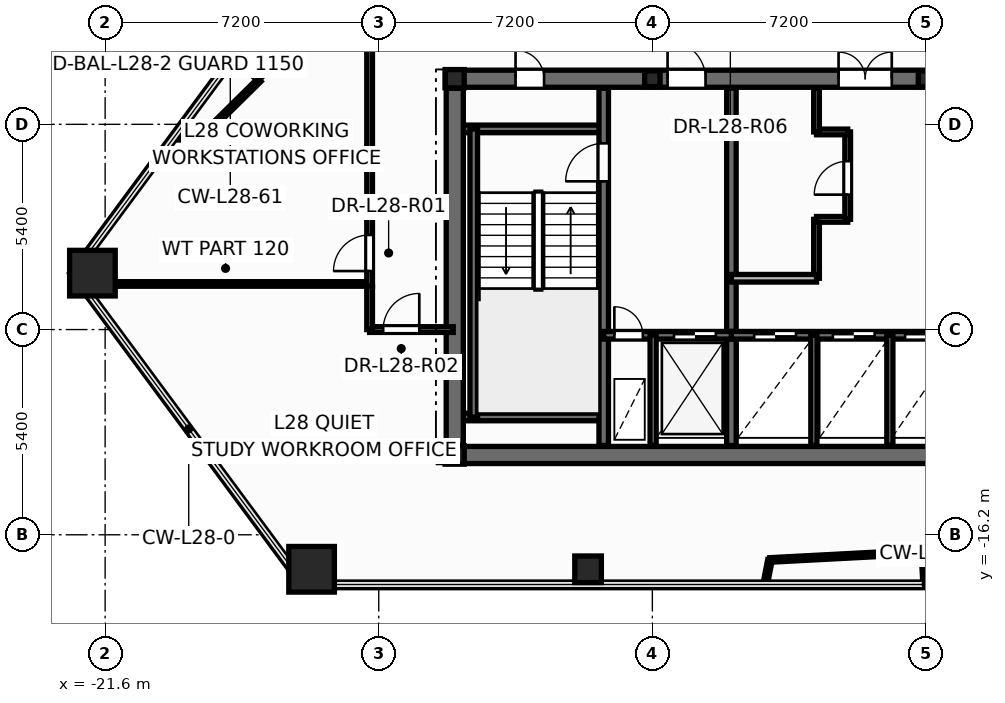
"""IFC4 building model, lengths in metres.
Left out: names, types, materials, properties, quantities, classifications, styles, units other than length and angle.
Written with IfcOpenShell. Run it as: python <this file> out.ifc"""

import sys

from ifc_helpers import new_model, si_unit, direction, frame, frame_2d, origin, origin_2d, place, context, subcontext, project, spatial, rectangle, hollow_rectangle, hollow_circle, i_section, extrude, element, fill, save


model = new_model("IFC4")
c1 = context("Model", 3, precision=1e-05, world=origin(), true_north=direction((0.0, 1.0)))
c2 = subcontext(c1, "Body", "Model", "MODEL_VIEW")
j1 = project(units=[si_unit("LENGTHUNIT", "METRE"), si_unit("PLANEANGLEUNIT", "RADIAN")], contexts=[c1])
p1 = place(None, origin())
s1 = spatial("IfcSite", under=j1, at=p1, CompositionType="ELEMENT")
p2 = place(p1, origin())
s2 = spatial("IfcBuilding", under=s1, at=p2, CompositionType="ELEMENT")
p3 = place(p2, frame((0.0, 0.0, 110.4)))
s3 = spatial("IfcBuildingStorey", under=s2, at=p3, CompositionType="ELEMENT", Elevation=110.4)
for number, where, z_axis, x_axis in (
    (1, (-21.934, -9.316, 0.0), (0.0, 0.0, 1.0), (1.0, 0.0, 0.0)),
    (2, (-16.167, -17.108, 0.0), (0.0, 0.0, 1.0), (1.0, 0.0, 0.0)),
):
    element("IfcColumn", number, at=place(p3, frame(where, z_axis=z_axis, x_axis=x_axis)), inside=s3, PredefinedType="COLUMN", context=c2, shape_type="SweptSolid", body=[
        extrude(hollow_rectangle(XDim=1.2, YDim=1.2, WallThickness=0.055, at=origin_2d()), origin(), (0.0, 0.0, 1.0), 3.6),
    ])
p4 = place(p3, frame((-8.892, -17.108, 0.0), z_axis=(0.0, 0.0, 1.0), x_axis=(1.0, 0.0, 0.0)))
e3 = element("IfcColumn", 3, at=p4, inside=s3, PredefinedType="COLUMN", context=c2, shape_type="SweptSolid", body=[
    extrude(hollow_circle(Radius=0.35, WallThickness=0.03, at=origin_2d()), origin(), (0.0, 0.0, 1.0), 3.6),
])
for number, where, z_axis, x_axis in (
    (4, (-12.4, -14.1, 0.0), (0.0, 0.0, 1.0), (1.0, 0.0, 0.0)),
    (5, (-12.4, -4.2, 0.0), (0.0, 0.0, 1.0), (1.0, 0.0, 0.0)),
):
    element("IfcColumn", number, at=place(p3, frame(where, z_axis=z_axis, x_axis=x_axis)), inside=s3, PredefinedType="COLUMN", context=c2, shape_type="SweptSolid", body=[
        extrude(i_section(OverallWidth=0.5, OverallDepth=0.482, WebThickness=0.04, FlangeThickness=0.045, at=origin_2d()), origin(), (0.0, 0.0, 1.0), 3.6),
    ])
for number, where, z_axis, x_axis in (
    (6, (-7.2, -4.2, 0.0), (0.0, 0.0, 1.0), (1.0, 0.0, 0.0)),
    (7, (0.0, -4.2, 0.0), (0.0, 0.0, 1.0), (1.0, 0.0, 0.0)),
):
    element("IfcColumn", number, at=place(p3, frame(where, z_axis=z_axis, x_axis=x_axis)), inside=s3, PredefinedType="PILASTER", context=c2, shape_type="SweptSolid", body=[
        extrude(i_section(OverallWidth=0.405, OverallDepth=0.414, WebThickness=0.022, FlangeThickness=0.032, at=origin_2d()), origin(), (0.0, 0.0, 1.0), 3.6),
    ])
p5 = place(p3, frame((-2.88, -9.45, 0.0), z_axis=(0.0, 0.0, 1.0), x_axis=(0.0, 1.0, 0.0)))
e8 = element("IfcWall", 8, at=p5, inside=s3, PredefinedType="PARTITIONING", context=c2, shape_type="SweptSolid", body=[
    extrude(rectangle(XDim=1.55, YDim=0.15, at=frame_2d((0.775, 0.0))), origin(), (0.0, 0.0, 1.0), 3.35),
])
p6 = place(p3, frame((-2.88, -7.9, 0.0), z_axis=(0.0, 0.0, 1.0), x_axis=(1.0, 0.0, 0.0)))
e9 = element("IfcWall", 9, at=p6, inside=s3, PredefinedType="PARTITIONING", context=c2, shape_type="SweptSolid", body=[
    extrude(rectangle(XDim=0.82, YDim=0.15, at=frame_2d((0.41, 0.0))), origin(), (0.0, 0.0, 1.0), 3.35),
])
p7 = place(p3, frame((-2.06, -7.9, 0.0), z_axis=(0.0, 0.0, 1.0), x_axis=(0.0, 1.0, 0.0)))
e10 = element("IfcWall", 10, at=p7, inside=s3, PredefinedType="PARTITIONING", context=c2, shape_type="SweptSolid", body=[
    extrude(rectangle(XDim=2.3, YDim=0.15, at=frame_2d((1.15, 0.0))), origin(), (0.0, 0.0, 1.0), 3.35),
])
p8 = place(p7, frame((0.65, 0.0, 0.0)))
e11 = element("IfcOpeningElement", 11, at=p8, cuts=e10, PredefinedType="OPENING", context=c2, shape_type="SweptSolid", body=[
    extrude(rectangle(XDim=0.886, YDim=2.104, at=frame_2d((0.44, 1.052))), frame((0.0, 0.085, 0.0), z_axis=(0.0, -1.0, 0.0), x_axis=(1.0, 0.0, 0.0)), (0.0, 0.0, 1.0), 0.17),
])
p9 = place(p3, frame((-2.88, -5.6, 0.0), z_axis=(0.0, 0.0, 1.0), x_axis=(1.0, 0.0, 0.0)))
e12 = element("IfcWall", 12, at=p9, inside=s3, PredefinedType="PARTITIONING", context=c2, shape_type="SweptSolid", body=[
    extrude(rectangle(XDim=0.82, YDim=0.15, at=frame_2d((0.41, 0.0))), origin(), (0.0, 0.0, 1.0), 3.35),
])
p10 = place(p3, frame((-2.88, -5.6, 0.0), z_axis=(0.0, 0.0, 1.0), x_axis=(0.0, 1.0, 0.0)))
e13 = element("IfcWall", 13, at=p10, inside=s3, PredefinedType="PARTITIONING", context=c2, shape_type="SweptSolid", body=[
    extrude(rectangle(XDim=1.15, YDim=0.15, at=frame_2d((0.575, 0.0))), origin(), (0.0, 0.0, 1.0), 3.35),
])
p11 = place(p3, frame((-12.65, -14.1, 0.0), z_axis=(0.0, 0.0, 1.0), x_axis=(1.0, 0.0, 0.0)))
e14 = element("IfcWall", 14, at=p11, inside=s3, PredefinedType="SHEAR", context=c2, shape_type="SweptSolid", body=[
    extrude(rectangle(XDim=25.3, YDim=0.45, at=frame_2d((12.65, 0.0))), origin(), (0.0, 0.0, 1.0), 3.6),
])
p12 = place(p3, frame((-12.65, -4.2, 0.0), z_axis=(0.0, 0.0, 1.0), x_axis=(1.0, 0.0, 0.0)))
e15 = element("IfcWall", 15, at=p12, inside=s3, PredefinedType="SHEAR", context=c2, shape_type="SweptSolid", body=[
    extrude(rectangle(XDim=25.3, YDim=0.45, at=frame_2d((12.65, 0.0))), origin(), (0.0, 0.0, 1.0), 3.6),
])
p13 = place(p12, frame((1.85, 0.0, 0.0)))
e16 = element("IfcOpeningElement", 16, at=p13, cuts=e15, PredefinedType="OPENING", context=c2, shape_type="SweptSolid", body=[
    extrude(rectangle(XDim=0.756, YDim=2.054, at=frame_2d((0.375, 1.027))), frame((0.0, 0.235, 0.0), z_axis=(0.0, -1.0, 0.0), x_axis=(1.0, 0.0, 0.0)), (0.0, 0.0, 1.0), 0.47),
])
p14 = place(p12, frame((21.85, 0.0, 0.0)))
e17 = element("IfcOpeningElement", 17, at=p14, cuts=e15, PredefinedType="OPENING", context=c2, shape_type="SweptSolid", body=[
    extrude(rectangle(XDim=0.756, YDim=2.054, at=frame_2d((0.375, 1.027))), frame((0.0, 0.235, 0.0), z_axis=(0.0, -1.0, 0.0), x_axis=(1.0, 0.0, 0.0)), (0.0, 0.0, 1.0), 0.47),
])
p15 = place(p12, frame((23.5, 0.0, 0.0)))
e18 = element("IfcOpeningElement", 18, at=p15, cuts=e15, PredefinedType="OPENING", context=c2, shape_type="SweptSolid", body=[
    extrude(rectangle(XDim=0.756, YDim=2.054, at=frame_2d((0.375, 1.027))), frame((0.0, 0.235, 0.0), z_axis=(0.0, -1.0, 0.0), x_axis=(1.0, 0.0, 0.0)), (0.0, 0.0, 1.0), 0.47),
])
p16 = place(p12, frame((5.85, 0.0, 0.0)))
e19 = element("IfcOpeningElement", 19, at=p16, cuts=e15, PredefinedType="OPENING", context=c2, shape_type="SweptSolid", body=[
    extrude(rectangle(XDim=1.006, YDim=2.104, at=frame_2d((0.5, 1.052))), frame((0.0, 0.235, 0.0), z_axis=(0.0, -1.0, 0.0), x_axis=(1.0, 0.0, 0.0)), (0.0, 0.0, 1.0), 0.47),
])
p17 = place(p12, frame((10.35, 0.0, 0.0)))
e20 = element("IfcOpeningElement", 20, at=p17, cuts=e15, PredefinedType="OPENING", context=c2, shape_type="SweptSolid", body=[
    extrude(rectangle(XDim=1.406, YDim=2.154, at=frame_2d((0.7, 1.077))), frame((0.0, 0.235, 0.0), z_axis=(0.0, -1.0, 0.0), x_axis=(1.0, 0.0, 0.0)), (0.0, 0.0, 1.0), 0.47),
])
p18 = place(p12, frame((18.45, 0.0, 0.0)))
e21 = element("IfcOpeningElement", 21, at=p18, cuts=e15, PredefinedType="OPENING", context=c2, shape_type="SweptSolid", body=[
    extrude(rectangle(XDim=1.006, YDim=2.104, at=frame_2d((0.5, 1.052))), frame((0.0, 0.235, 0.0), z_axis=(0.0, -1.0, 0.0), x_axis=(1.0, 0.0, 0.0)), (0.0, 0.0, 1.0), 0.47),
])
for number, where, z_axis, x_axis in (
    (22, (-12.35, -5.52, 0.0), (0.0, 0.0, 1.0), (1.0, 0.0, 0.0)),
    (23, (-12.35, -13.1, 0.0), (0.0, 0.0, 1.0), (1.0, 0.0, 0.0)),
):
    element("IfcWall", number, at=place(p3, frame(where, z_axis=z_axis, x_axis=x_axis)), inside=s3, PredefinedType="SOLIDWALL", context=c2, shape_type="SweptSolid", body=[
        extrude(rectangle(XDim=3.87, YDim=0.2, at=frame_2d((1.935, 0.0))), origin(), (0.0, 0.0, 1.0), 3.6),
    ])
p19 = place(p3, frame((-11.9, -13.1, 0.0), z_axis=(0.0, 0.0, 1.0), x_axis=(0.0, 1.0, 0.0)))
e24 = element("IfcWall", 24, at=p19, inside=s3, PredefinedType="SOLIDWALL", context=c2, shape_type="SweptSolid", body=[
    extrude(rectangle(XDim=7.58, YDim=0.2, at=frame_2d((3.79, 0.0))), origin(), (0.0, 0.0, 1.0), 3.6),
])
p20 = place(p3, frame((-8.48, -13.85, 0.0), z_axis=(0.0, 0.0, 1.0), x_axis=(0.0, 1.0, 0.0)))
e25 = element("IfcWall", 25, at=p20, inside=s3, PredefinedType="SHEAR", context=c2, shape_type="SweptSolid", body=[
    extrude(rectangle(XDim=9.4, YDim=0.25, at=frame_2d((4.7, 0.0))), origin(), (0.0, 0.0, 1.0), 3.6),
])
p21 = place(p20, frame((6.95, 0.0, 0.0)))
e26 = element("IfcOpeningElement", 26, at=p21, cuts=e25, PredefinedType="OPENING", context=c2, shape_type="SweptSolid", body=[
    extrude(rectangle(XDim=1.006, YDim=2.104, at=frame_2d((0.5, 1.052))), frame((0.0, 0.135, 0.0), z_axis=(0.0, -1.0, 0.0), x_axis=(1.0, 0.0, 0.0)), (0.0, 0.0, 1.0), 0.27),
])
p22 = place(p3, frame((-5.12, -13.85, 0.0), z_axis=(0.0, 0.0, 1.0), x_axis=(0.0, 1.0, 0.0)))
e27 = element("IfcWall", 27, at=p22, inside=s3, PredefinedType="SHEAR", context=c2, shape_type="SweptSolid", body=[
    extrude(rectangle(XDim=9.4, YDim=0.25, at=frame_2d((4.7, 0.0))), origin(), (0.0, 0.0, 1.0), 3.6),
])
p23 = place(p3, frame((-8.48, -10.95, 0.0), z_axis=(0.0, 0.0, 1.0), x_axis=(1.0, 0.0, 0.0)))
e28 = element("IfcWall", 28, at=p23, inside=s3, PredefinedType="SOLIDWALL", context=c2, shape_type="SweptSolid", body=[
    extrude(rectangle(XDim=3.36, YDim=0.2, at=frame_2d((1.68, 0.0))), origin(), (0.0, 0.0, 1.0), 3.6),
])
p24 = place(p23, frame((0.28, 0.0, 0.0)))
e29 = element("IfcOpeningElement", 29, at=p24, cuts=e28, PredefinedType="OPENING", context=c2, shape_type="SweptSolid", body=[
    extrude(rectangle(XDim=0.756, YDim=2.054, at=frame_2d((0.375, 1.027))), frame((0.0, 0.11, 0.0), z_axis=(0.0, -1.0, 0.0), x_axis=(1.0, 0.0, 0.0)), (0.0, 0.0, 1.0), 0.22),
])
p25 = place(p23, frame((1.85, 0.0, 0.0)))
e30 = element("IfcOpeningElement", 30, at=p25, cuts=e28, PredefinedType="OPENING", context=c2, shape_type="SweptSolid", body=[
    extrude(rectangle(XDim=1.106, YDim=2.104, at=frame_2d((0.55, 1.052))), frame((0.0, 0.11, 0.0), z_axis=(0.0, -1.0, 0.0), x_axis=(1.0, 0.0, 0.0)), (0.0, 0.0, 1.0), 0.22),
])
p26 = place(p3, frame((-5.12, -10.95, 0.0), z_axis=(0.0, 0.0, 1.0), x_axis=(1.0, 0.0, 0.0)))
e31 = element("IfcWall", 31, at=p26, inside=s3, PredefinedType="SOLIDWALL", context=c2, shape_type="SweptSolid", body=[
    extrude(rectangle(XDim=10.24, YDim=0.2, at=frame_2d((5.12, 0.0))), origin(), (0.0, 0.0, 1.0), 3.6),
])
p27 = place(p26, frame((0.6, 0.0, 0.0)))
e32 = element("IfcOpeningElement", 32, at=p27, cuts=e31, PredefinedType="OPENING", context=c2, shape_type="SweptSolid", body=[
    extrude(rectangle(XDim=1.106, YDim=2.104, at=frame_2d((0.55, 1.052))), frame((0.0, 0.11, 0.0), z_axis=(0.0, -1.0, 0.0), x_axis=(1.0, 0.0, 0.0)), (0.0, 0.0, 1.0), 0.22),
])
p28 = place(p26, frame((2.67, 0.0, 0.0)))
e33 = element("IfcOpeningElement", 33, at=p28, cuts=e31, PredefinedType="OPENING", context=c2, shape_type="SweptSolid", body=[
    extrude(rectangle(XDim=1.106, YDim=2.104, at=frame_2d((0.55, 1.052))), frame((0.0, 0.11, 0.0), z_axis=(0.0, -1.0, 0.0), x_axis=(1.0, 0.0, 0.0)), (0.0, 0.0, 1.0), 0.22),
])
p29 = place(p26, frame((4.57, 0.0, 0.0)))
e34 = element("IfcOpeningElement", 34, at=p29, cuts=e31, PredefinedType="OPENING", context=c2, shape_type="SweptSolid", body=[
    extrude(rectangle(XDim=1.106, YDim=2.104, at=frame_2d((0.55, 1.052))), frame((0.0, 0.11, 0.0), z_axis=(0.0, -1.0, 0.0), x_axis=(1.0, 0.0, 0.0)), (0.0, 0.0, 1.0), 0.22),
])
p30 = place(p26, frame((6.47, 0.0, 0.0)))
e35 = element("IfcOpeningElement", 35, at=p30, cuts=e31, PredefinedType="OPENING", context=c2, shape_type="SweptSolid", body=[
    extrude(rectangle(XDim=1.106, YDim=2.104, at=frame_2d((0.55, 1.052))), frame((0.0, 0.11, 0.0), z_axis=(0.0, -1.0, 0.0), x_axis=(1.0, 0.0, 0.0)), (0.0, 0.0, 1.0), 0.22),
])
p31 = place(p26, frame((8.54, 0.0, 0.0)))
e36 = element("IfcOpeningElement", 36, at=p31, cuts=e31, PredefinedType="OPENING", context=c2, shape_type="SweptSolid", body=[
    extrude(rectangle(XDim=1.106, YDim=2.104, at=frame_2d((0.55, 1.052))), frame((0.0, 0.11, 0.0), z_axis=(0.0, -1.0, 0.0), x_axis=(1.0, 0.0, 0.0)), (0.0, 0.0, 1.0), 0.22),
])
for number, where, z_axis, x_axis in (
    (37, (-7.18, -13.85, 0.0), (0.0, 0.0, 1.0), (0.0, 1.0, 0.0)),
    (38, (-2.95, -13.85, 0.0), (0.0, 0.0, 1.0), (0.0, 1.0, 0.0)),
):
    element("IfcWall", number, at=place(p3, frame(where, z_axis=z_axis, x_axis=x_axis)), inside=s3, PredefinedType="PARTITIONING", context=c2, shape_type="SweptSolid", body=[
        extrude(rectangle(XDim=2.9, YDim=0.16, at=frame_2d((1.45, 0.0))), origin(), (0.0, 0.0, 1.0), 2.375),
    ])
p32 = place(p3, frame((-12.4, -13.85, 0.0), z_axis=(0.0, 0.0, 1.0), x_axis=(0.0, 1.0, 0.0)))
e39 = element("IfcWall", 39, at=p32, inside=s3, PredefinedType="SHEAR", context=c2, shape_type="SweptSolid", body=[
    extrude(rectangle(XDim=9.4, YDim=0.45, at=frame_2d((4.7, 0.0))), origin(), (0.0, 0.0, 1.0), 3.6),
])
p33 = place(p3, frame((-5.12, -9.45, 0.0), z_axis=(0.0, 0.0, 1.0), x_axis=(1.0, 0.0, 0.0)))
e40 = element("IfcWall", 40, at=p33, inside=s3, PredefinedType="SOLIDWALL", context=c2, shape_type="SweptSolid", body=[
    extrude(rectangle(XDim=2.24, YDim=0.2, at=frame_2d((1.12, 0.0))), origin(), (0.0, 0.0, 1.0), 3.35),
])
p34 = place(p3, frame((-0.95, -13.85, 0.0), z_axis=(0.0, 0.0, 1.0), x_axis=(0.0, 1.0, 0.0)))
e41 = element("IfcWall", 41, at=p34, inside=s3, PredefinedType="PARTITIONING", context=c2, shape_type="SweptSolid", body=[
    extrude(rectangle(XDim=2.9, YDim=0.16, at=frame_2d((1.45, 0.0))), origin(), (0.0, 0.0, 1.0), 2.375),
])
p35 = place(p3, frame((-22.221, -9.6, 0.0), z_axis=(0.0, 0.0, 1.0), x_axis=(1.0, 0.0, 0.0)))
e42 = element("IfcWall", 42, at=p35, inside=s3, PredefinedType="PARTITIONING", context=c2, shape_type="SweptSolid", body=[
    extrude(rectangle(XDim=7.582, YDim=0.12, at=frame_2d((3.791, 0.0))), origin(), (0.0, 0.0, 1.0), 2.713),
])
p36 = place(p3, frame((-14.64, -9.66, 0.0), z_axis=(0.0, 0.0, 1.0), x_axis=(0.0, 1.0, 0.0)))
e43 = element("IfcWall", 43, at=p36, inside=s3, PredefinedType="PARTITIONING", context=c2, shape_type="SweptSolid", body=[
    extrude(rectangle(XDim=6.9, YDim=0.15, at=frame_2d((3.45, 0.0))), origin(), (0.0, 0.0, 1.0), 2.325),
])
p37 = place(p36, frame((0.399, 0.0, 0.0)))
e44 = element("IfcOpeningElement", 44, at=p37, cuts=e43, PredefinedType="OPENING", context=c2, shape_type="SweptSolid", body=[
    extrude(rectangle(XDim=0.956, YDim=2.104, at=frame_2d((0.475, 1.052))), frame((0.0, 0.085, 0.0), z_axis=(0.0, -1.0, 0.0), x_axis=(1.0, 0.0, 0.0)), (0.0, 0.0, 1.0), 0.17),
])
p38 = place(p3, frame((-4.106, -16.862, 0.0), z_axis=(0.0, 0.0, 1.0), x_axis=(0.998632960737, 0.052270543608, 0.0)))
e45 = element("IfcWall", 45, at=p38, inside=s3, PredefinedType="PARTITIONING", context=c2, shape_type="SweptSolid", body=[
    extrude(rectangle(XDim=4.045, YDim=0.12, at=frame_2d((2.022, 0.0))), origin(), (0.0, 0.0, 1.0), 3.35),
])
p39 = place(p3, frame((-14.64, -10.8, 0.0), z_axis=(0.0, 0.0, 1.0), x_axis=(1.0, 0.0, 0.0)))
e46 = element("IfcWall", 46, at=p39, inside=s3, PredefinedType="PARTITIONING", context=c2, shape_type="SweptSolid", body=[
    extrude(rectangle(XDim=2.2, YDim=0.15, at=frame_2d((1.1, 0.0))), origin(), (0.0, 0.0, 1.0), 2.713),
])
p40 = place(p39, frame((0.357, 0.0, 0.0)))
e47 = element("IfcOpeningElement", 47, at=p40, cuts=e46, PredefinedType="OPENING", context=c2, shape_type="SweptSolid", body=[
    extrude(rectangle(XDim=0.956, YDim=2.104, at=frame_2d((0.475, 1.052))), frame((0.0, 0.085, 0.0), z_axis=(0.0, -1.0, 0.0), x_axis=(1.0, 0.0, 0.0)), (0.0, 0.0, 1.0), 0.17),
])
p41 = place(p3, frame((-17.538, -4.229, 0.0), z_axis=(0.0, 0.0, 1.0), x_axis=(-0.711889877925, -0.702291108949, 0.0)))
e48 = element("IfcWall", 48, at=p41, inside=s3, PredefinedType="PARTITIONING", context=c2, shape_type="SweptSolid", body=[
    extrude(rectangle(XDim=2.162, YDim=0.12, at=frame_2d((1.081, 0.0))), origin(), (0.0, 0.0, 1.0), 3.35),
])
p42 = place(p3, frame((-14.64, -10.8, 0.0), z_axis=(0.0, 0.0, 1.0), x_axis=(0.0, 1.0, 0.0)))
e49 = element("IfcWall", 49, at=p42, inside=s3, PredefinedType="PARTITIONING", context=c2, shape_type="SweptSolid", body=[
    extrude(rectangle(XDim=1.138, YDim=0.15, at=frame_2d((0.569, 0.0))), origin(), (0.0, 0.0, 1.0), 3.35),
])
p43 = place(p3, frame((-18.176, -3.582, 0.0), z_axis=(0.0, 0.0, 1.0), x_axis=(0.702387049148, -0.711795218577, 0.0)))
e50 = element("IfcWall", 50, at=p43, inside=s3, PredefinedType="PARTITIONING", context=c2, shape_type="SweptSolid", body=[
    extrude(rectangle(XDim=0.908, YDim=0.12, at=frame_2d((0.454, 0.0))), origin(), (0.0, 0.0, 1.0), 2.713),
])
p44 = place(p3, frame((-0.066, -16.651, 0.0), z_axis=(0.0, 0.0, 1.0), x_axis=(0.052377572973, -0.998627352845, 0.0)))
e51 = element("IfcWall", 51, at=p44, inside=s3, PredefinedType="PARTITIONING", context=c2, shape_type="SweptSolid", body=[
    extrude(rectangle(XDim=0.848, YDim=0.12, at=frame_2d((0.424, 0.0))), origin(), (0.0, 0.0, 1.0), 2.713),
])
p45 = place(p3, frame((0.031, -17.325, 0.0), z_axis=(0.0, 0.0, 1.0), x_axis=(0.052425994835, 0.998624811962, 0.0)))
e52 = element("IfcWall", 52, at=p45, inside=s3, PredefinedType="PARTITIONING", context=c2, shape_type="SweptSolid", body=[
    extrude(rectangle(XDim=0.675, YDim=0.12, at=frame_2d((0.338, 0.0))), origin(), (0.0, 0.0, 1.0), 2.713),
])
p46 = place(p3, frame((-19.077, -5.747, 0.0), z_axis=(0.0, 0.0, 1.0), x_axis=(-0.999965519438, -0.008304211926, 0.0)))
e53 = element("IfcWall", 53, at=p46, inside=s3, PredefinedType="PARTITIONING", context=c2, shape_type="SweptSolid", body=[
    extrude(rectangle(XDim=0.706, YDim=0.12, at=frame_2d((0.353, 0.0))), origin(), (0.0, 0.0, 1.0), 2.713),
])
p47 = place(p3, frame((-4.23, -17.498, 0.0), z_axis=(0.0, 0.0, 1.0), x_axis=(0.191474935373, 0.981497503371, 0.0)))
e54 = element("IfcWall", 54, at=p47, inside=s3, PredefinedType="PARTITIONING", context=c2, shape_type="SweptSolid", body=[
    extrude(rectangle(XDim=0.648, YDim=0.12, at=frame_2d((0.324, 0.0))), origin(), (0.0, 0.0, 1.0), 2.713),
])
p48 = place(p8, origin())
e55 = element("IfcDoor", 55, at=p48, inside=s3, OperationType="SINGLE_SWING_LEFT", PredefinedType="DOOR", context=c2, shape_type="SweptSolid", body=[
    extrude(rectangle(XDim=0.88, YDim=2.1, at=frame_2d((0.44, 1.05))), frame((0.0, 0.025, 0.0), z_axis=(0.0, -1.0, 0.0), x_axis=(1.0, 0.0, 0.0)), (0.0, 0.0, 1.0), 0.05),
])
fill(e11, e55)
p49 = place(p21, origin())
e56 = element("IfcDoor", 56, at=p49, inside=s3, OperationType="SINGLE_SWING_LEFT", PredefinedType="DOOR", context=c2, shape_type="SweptSolid", body=[
    extrude(rectangle(XDim=1.0, YDim=2.1, at=frame_2d((0.5, 1.05))), frame((0.0, 0.025, 0.0), z_axis=(0.0, -1.0, 0.0), x_axis=(1.0, 0.0, 0.0)), (0.0, 0.0, 1.0), 0.05),
])
fill(e26, e56)
p50 = place(p24, origin())
e57 = element("IfcDoor", 57, at=p50, inside=s3, OperationType="SINGLE_SWING_LEFT", PredefinedType="DOOR", context=c2, shape_type="SweptSolid", body=[
    extrude(rectangle(XDim=0.75, YDim=2.05, at=frame_2d((0.375, 1.025))), frame((0.0, 0.025, 0.0), z_axis=(0.0, -1.0, 0.0), x_axis=(1.0, 0.0, 0.0)), (0.0, 0.0, 1.0), 0.05),
])
fill(e29, e57)
p51 = place(p25, origin())
e58 = element("IfcDoor", 58, at=p51, inside=s3, OperationType="DOUBLE_DOOR_SLIDING", PredefinedType="DOOR", context=c2, shape_type="SweptSolid", body=[
    extrude(rectangle(XDim=1.1, YDim=2.1, at=frame_2d((0.55, 1.05))), frame((0.0, 0.025, 0.0), z_axis=(0.0, -1.0, 0.0), x_axis=(1.0, 0.0, 0.0)), (0.0, 0.0, 1.0), 0.05),
])
fill(e30, e58)
p52 = place(p27, origin())
e59 = element("IfcDoor", 59, at=p52, inside=s3, OperationType="DOUBLE_DOOR_SLIDING", PredefinedType="DOOR", context=c2, shape_type="SweptSolid", body=[
    extrude(rectangle(XDim=1.1, YDim=2.1, at=frame_2d((0.55, 1.05))), frame((0.0, 0.025, 0.0), z_axis=(0.0, -1.0, 0.0), x_axis=(1.0, 0.0, 0.0)), (0.0, 0.0, 1.0), 0.05),
])
fill(e32, e59)
p53 = place(p28, origin())
e60 = element("IfcDoor", 60, at=p53, inside=s3, OperationType="DOUBLE_DOOR_SLIDING", PredefinedType="DOOR", context=c2, shape_type="SweptSolid", body=[
    extrude(rectangle(XDim=1.1, YDim=2.1, at=frame_2d((0.55, 1.05))), frame((0.0, 0.025, 0.0), z_axis=(0.0, -1.0, 0.0), x_axis=(1.0, 0.0, 0.0)), (0.0, 0.0, 1.0), 0.05),
])
fill(e33, e60)
p54 = place(p29, origin())
e61 = element("IfcDoor", 61, at=p54, inside=s3, OperationType="DOUBLE_DOOR_SLIDING", PredefinedType="DOOR", context=c2, shape_type="SweptSolid", body=[
    extrude(rectangle(XDim=1.1, YDim=2.1, at=frame_2d((0.55, 1.05))), frame((0.0, 0.025, 0.0), z_axis=(0.0, -1.0, 0.0), x_axis=(1.0, 0.0, 0.0)), (0.0, 0.0, 1.0), 0.05),
])
fill(e34, e61)
p55 = place(p13, origin())
e62 = element("IfcDoor", 62, at=p55, inside=s3, OperationType="SINGLE_SWING_LEFT", PredefinedType="DOOR", context=c2, shape_type="SweptSolid", body=[
    extrude(rectangle(XDim=0.75, YDim=2.05, at=frame_2d((0.375, 1.025))), frame((0.0, 0.025, 0.0), z_axis=(0.0, -1.0, 0.0), x_axis=(1.0, 0.0, 0.0)), (0.0, 0.0, 1.0), 0.05),
])
fill(e16, e62)
p56 = place(p16, origin())
e63 = element("IfcDoor", 63, at=p56, inside=s3, OperationType="SINGLE_SWING_LEFT", PredefinedType="DOOR", context=c2, shape_type="SweptSolid", body=[
    extrude(rectangle(XDim=1.0, YDim=2.1, at=frame_2d((0.5, 1.05))), frame((0.0, 0.025, 0.0), z_axis=(0.0, -1.0, 0.0), x_axis=(1.0, 0.0, 0.0)), (0.0, 0.0, 1.0), 0.05),
])
fill(e19, e63)
p57 = place(p17, origin())
e64 = element("IfcDoor", 64, at=p57, inside=s3, OperationType="DOUBLE_DOOR_SINGLE_SWING", PredefinedType="DOOR", context=c2, shape_type="SweptSolid", body=[
    extrude(rectangle(XDim=1.4, YDim=2.15, at=frame_2d((0.7, 1.075))), frame((0.0, 0.025, 0.0), z_axis=(0.0, -1.0, 0.0), x_axis=(1.0, 0.0, 0.0)), (0.0, 0.0, 1.0), 0.05),
])
fill(e20, e64)
p58 = place(p37, origin())
e65 = element("IfcDoor", 65, at=p58, inside=s3, OperationType="SINGLE_SWING_LEFT", PredefinedType="DOOR", context=c2, shape_type="SweptSolid", body=[
    extrude(rectangle(XDim=0.95, YDim=2.1, at=frame_2d((0.475, 1.05))), frame((0.0, 0.025, 0.0), z_axis=(0.0, -1.0, 0.0), x_axis=(1.0, 0.0, 0.0)), (0.0, 0.0, 1.0), 0.05),
])
fill(e44, e65)
p59 = place(p40, origin())
e66 = element("IfcDoor", 66, at=p59, inside=s3, OperationType="SINGLE_SWING_RIGHT", PredefinedType="DOOR", context=c2, shape_type="SweptSolid", body=[
    extrude(rectangle(XDim=0.95, YDim=2.1, at=frame_2d((0.475, 1.05))), frame((0.0, 0.025, 0.0), z_axis=(0.0, -1.0, 0.0), x_axis=(1.0, 0.0, 0.0)), (0.0, 0.0, 1.0), 0.05),
])
fill(e47, e66)
save(model, sys.argv[1])
